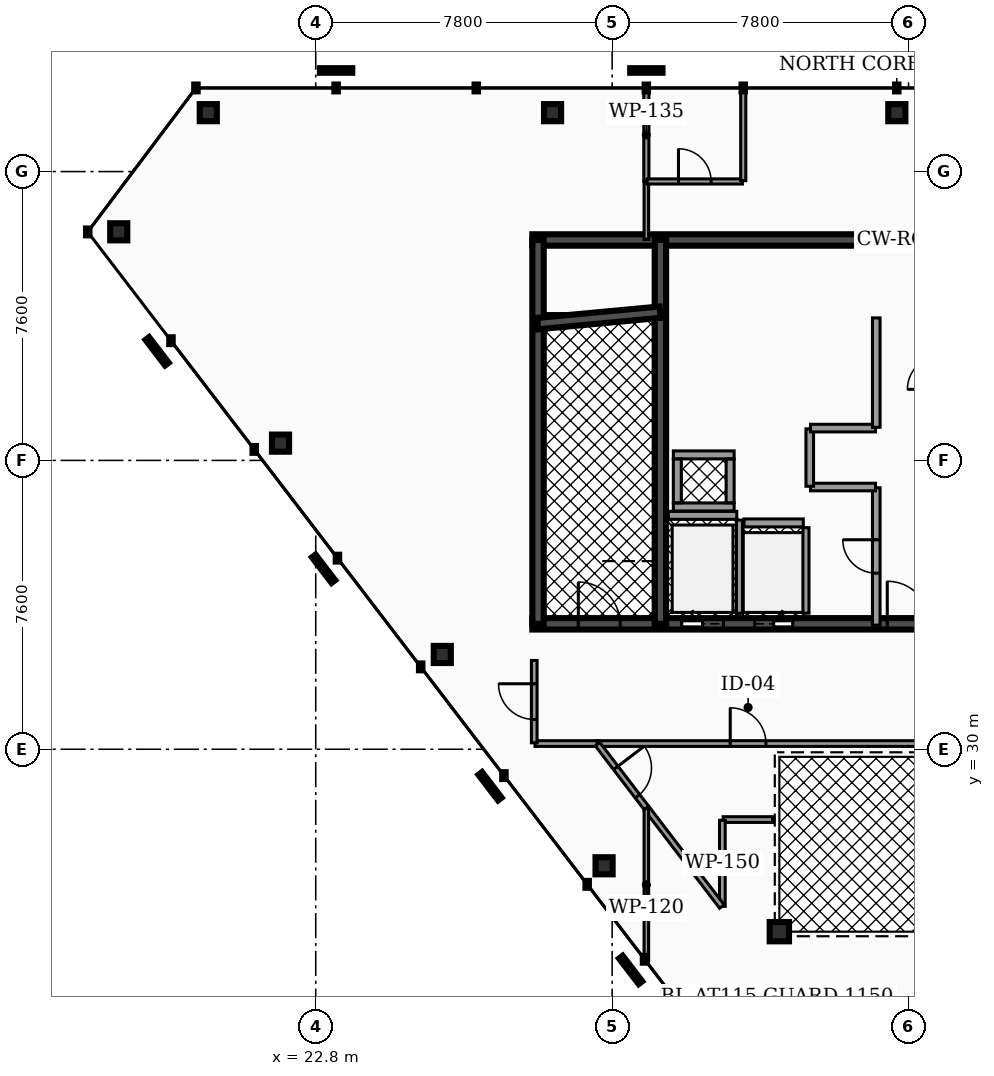
"""IFC4 building model, lengths in metres.
Left out: names, types, materials, properties, quantities, classifications, styles, units other than length and angle.
Written with IfcOpenShell. Run it as: python <this file> out.ifc"""

import sys

from ifc_helpers import new_model, si_unit, direction, frame, frame_2d, origin, origin_2d, place, context, subcontext, project, spatial, rectangle, hollow_rectangle, hollow_circle, extrude, element, fill, save


model = new_model("IFC4")
c1 = context("Model", 3, precision=1e-05, world=origin(), true_north=direction((0.0, 1.0)))
c2 = subcontext(c1, "Body", "Model", "MODEL_VIEW")
j1 = project(units=[si_unit("LENGTHUNIT", "METRE"), si_unit("PLANEANGLEUNIT", "RADIAN")], contexts=[c1])
p1 = place(None, origin())
s1 = spatial("IfcSite", under=j1, at=p1, CompositionType="ELEMENT")
p2 = place(p1, origin())
s2 = spatial("IfcBuilding", under=s1, at=p2, CompositionType="ELEMENT")
p3 = place(p2, frame((0.0, 0.0, 299.2)))
s3 = spatial("IfcBuildingStorey", under=s2, at=p3, CompositionType="ELEMENT", Elevation=299.2)
p4 = place(p3, frame((28.5, 43.4, 0.0), z_axis=(0.0, 0.0, 1.0), x_axis=(1.0, 0.0, 0.0)))
e1 = element("IfcWall", 1, at=p4, inside=s3, PredefinedType="SHEAR", context=c2, shape_type="SweptSolid", body=[
    extrude(rectangle(XDim=19.86, YDim=0.3, at=frame_2d((9.93, 0.0))), origin(), (0.0, 0.0, 1.0), 3.78),
])
p5 = place(p3, frame((28.5, 33.3, 0.0), z_axis=(0.0, 0.0, 1.0), x_axis=(1.0, 0.0, 0.0)))
e2 = element("IfcWall", 2, at=p5, inside=s3, PredefinedType="SHEAR", context=c2, shape_type="SweptSolid", body=[
    extrude(rectangle(XDim=19.86, YDim=0.3, at=frame_2d((9.93, 0.0))), origin(), (0.0, 0.0, 1.0), 3.78),
])
p6 = place(p5, frame((3.93, 0.0, 0.0)))
e3 = element("IfcOpeningElement", 3, at=p6, cuts=e2, PredefinedType="OPENING", context=c2, shape_type="SweptSolid", body=[
    extrude(rectangle(XDim=1.1, YDim=2.15, at=frame_2d((0.55, 1.075))), frame((0.0, 0.16, 0.0), z_axis=(0.0, -1.0, 0.0), x_axis=(1.0, 0.0, 0.0)), (0.0, 0.0, 1.0), 0.32),
])
p7 = place(p5, frame((14.77, 0.0, 0.0)))
e4 = element("IfcOpeningElement", 4, at=p7, cuts=e2, PredefinedType="OPENING", context=c2, shape_type="SweptSolid", body=[
    extrude(rectangle(XDim=1.1, YDim=2.15, at=frame_2d((0.55, 1.075))), frame((0.0, 0.16, 0.0), z_axis=(0.0, -1.0, 0.0), x_axis=(1.0, 0.0, 0.0)), (0.0, 0.0, 1.0), 0.32),
])
p8 = place(p5, frame((11.25, 0.0, 0.0)))
e5 = element("IfcOpeningElement", 5, at=p8, cuts=e2, PredefinedType="OPENING", context=c2, shape_type="SweptSolid", body=[
    extrude(rectangle(XDim=1.0, YDim=2.1, at=frame_2d((0.5, 1.05))), frame((0.0, 0.16, 0.0), z_axis=(0.0, -1.0, 0.0), x_axis=(1.0, 0.0, 0.0)), (0.0, 0.0, 1.0), 0.32),
])
p9 = place(p5, frame((12.95, 0.0, 0.0)))
e6 = element("IfcOpeningElement", 6, at=p9, cuts=e2, PredefinedType="OPENING", context=c2, shape_type="SweptSolid", body=[
    extrude(rectangle(XDim=1.0, YDim=2.1, at=frame_2d((0.5, 1.05))), frame((0.0, 0.16, 0.0), z_axis=(0.0, -1.0, 0.0), x_axis=(1.0, 0.0, 0.0)), (0.0, 0.0, 1.0), 0.32),
])
p10 = place(p5, frame((5.85, 0.0, 0.0)))
e7 = element("IfcOpeningElement", 7, at=p10, cuts=e2, PredefinedType="OPENING", context=c2, shape_type="SweptSolid", body=[
    extrude(rectangle(XDim=1.0, YDim=2.1, at=frame_2d((0.5, 1.05))), frame((0.0, 0.16, 0.0), z_axis=(0.0, -1.0, 0.0), x_axis=(1.0, 0.0, 0.0)), (0.0, 0.0, 1.0), 0.32),
])
p11 = place(p5, frame((1.21, 0.0, 0.0)))
e8 = element("IfcOpeningElement", 8, at=p11, cuts=e2, PredefinedType="OPENING", context=c2, shape_type="SweptSolid", body=[
    extrude(rectangle(XDim=1.1, YDim=2.2, at=frame_2d((0.55, 1.1))), frame((0.0, 0.16, 0.0), z_axis=(0.0, -1.0, 0.0), x_axis=(1.0, 0.0, 0.0)), (0.0, 0.0, 1.0), 0.32),
])
p12 = place(p5, frame((9.34, 0.0, 0.0)))
e9 = element("IfcOpeningElement", 9, at=p12, cuts=e2, PredefinedType="OPENING", context=c2, shape_type="SweptSolid", body=[
    extrude(rectangle(XDim=1.12, YDim=2.05, at=frame_2d((0.56, 1.025))), frame((0.0, 0.16, 0.0), z_axis=(0.0, -1.0, 0.0), x_axis=(1.0, 0.0, 0.0)), (0.0, 0.0, 1.0), 0.32),
])
p13 = place(p5, frame((17.55, 0.0, 0.0)))
e10 = element("IfcOpeningElement", 10, at=p13, cuts=e2, PredefinedType="OPENING", context=c2, shape_type="SweptSolid", body=[
    extrude(rectangle(XDim=1.1, YDim=2.2, at=frame_2d((0.55, 1.1))), frame((0.0, 0.16, 0.0), z_axis=(0.0, -1.0, 0.0), x_axis=(1.0, 0.0, 0.0)), (0.0, 0.0, 1.0), 0.32),
])
for number, where, z_axis, x_axis in (
    (11, (28.65, 33.3, 0.0), (0.0, 0.0, 1.0), (0.0, 1.0, 0.0)),
    (12, (31.87, 33.3, 0.0), (0.0, 0.0, 1.0), (0.0, 1.0, 0.0)),
):
    element("IfcWall", number, at=place(p3, frame(where, z_axis=z_axis, x_axis=x_axis)), inside=s3, PredefinedType="SHEAR", context=c2, shape_type="SweptSolid", body=[
        extrude(rectangle(XDim=10.1, YDim=0.3, at=frame_2d((5.05, 0.0))), origin(), (0.0, 0.0, 1.0), 3.78),
    ])
p14 = place(p3, frame((28.64, 41.2, 0.0), z_axis=(0.0, 0.0, 1.0), x_axis=(0.995687118776, 0.092774789157, 0.0)))
e13 = element("IfcWall", 13, at=p14, inside=s3, PredefinedType="SHEAR", context=c2, shape_type="SweptSolid", body=[
    extrude(rectangle(XDim=3.234, YDim=0.3, at=frame_2d((1.617, 0.0))), origin(), (0.0, 0.0, 1.0), 3.78),
])
for number, where, z_axis, x_axis in (
    (14, (38.091, 46.75, 0.0), (0.0, 0.0, 1.0), (1.0, 0.0, 0.0)),
    (15, (29.032, 46.75, 0.0), (0.0, 0.0, 1.0), (1.0, 0.0, 0.0)),
    (16, (19.973, 46.75, 0.0), (0.0, 0.0, 1.0), (1.0, 0.0, 0.0)),
    (17, (17.616, 43.615, 0.0), (0.0, 0.0, 1.0), (1.0, 0.0, 0.0)),
    (18, (21.873, 38.055, 0.0), (0.0, 0.0, 1.0), (1.0, 0.0, 0.0)),
    (19, (26.131, 32.494, 0.0), (0.0, 0.0, 1.0), (1.0, 0.0, 0.0)),
    (20, (30.388, 26.934, 0.0), (0.0, 0.0, 1.0), (1.0, 0.0, 0.0)),
):
    element("IfcColumn", number, at=place(p3, frame(where, z_axis=z_axis, x_axis=x_axis)), inside=s3, PredefinedType="COLUMN", context=c2, shape_type="SweptSolid", body=[
        extrude(hollow_rectangle(XDim=0.45, YDim=0.45, WallThickness=0.022, at=origin_2d()), origin(), (0.0, 0.0, 1.0), 3.78),
    ])
p15 = place(p3, frame((35.0, 25.2, 0.0), z_axis=(0.0, 0.0, 1.0), x_axis=(1.0, 0.0, 0.0)))
e21 = element("IfcColumn", 21, at=p15, inside=s3, PredefinedType="COLUMN", context=c2, shape_type="SweptSolid", body=[
    extrude(hollow_circle(Radius=0.254, WallThickness=0.02, at=origin_2d()), origin(), (0.0, 0.0, 1.0), 3.78),
])
p16 = place(p3, frame((32.08, 36.155, 0.0), z_axis=(0.0, 0.0, 1.0), x_axis=(1.0, 0.0, 0.0)))
e22 = element("IfcWall", 22, at=p16, inside=s3, PredefinedType="SOLIDWALL", context=c2, shape_type="SweptSolid", body=[
    extrude(rectangle(XDim=1.8, YDim=0.21, at=frame_2d((0.9, 0.0))), origin(), (0.0, 0.0, 1.0), 2.85),
])
p17 = place(p3, frame((33.95, 33.58, 0.0), z_axis=(0.0, 0.0, 1.0), x_axis=(0.0, 1.0, 0.0)))
e23 = element("IfcWall", 23, at=p17, inside=s3, PredefinedType="SOLIDWALL", context=c2, shape_type="SweptSolid", body=[
    extrude(rectangle(XDim=2.45, YDim=0.16, at=frame_2d((1.225, 0.0))), origin(), (0.0, 0.0, 1.0), 2.85),
])
p18 = place(p3, frame((34.07, 35.955, 0.0), z_axis=(0.0, 0.0, 1.0), x_axis=(1.0, 0.0, 0.0)))
e24 = element("IfcWall", 24, at=p18, inside=s3, PredefinedType="SOLIDWALL", context=c2, shape_type="SweptSolid", body=[
    extrude(rectangle(XDim=1.56, YDim=0.21, at=frame_2d((0.78, 0.0))), origin(), (0.0, 0.0, 1.0), 2.85),
])
p19 = place(p3, frame((35.7, 33.58, 0.0), z_axis=(0.0, 0.0, 1.0), x_axis=(0.0, 1.0, 0.0)))
e25 = element("IfcWall", 25, at=p19, inside=s3, PredefinedType="SOLIDWALL", context=c2, shape_type="SweptSolid", body=[
    extrude(rectangle(XDim=2.25, YDim=0.16, at=frame_2d((1.125, 0.0))), origin(), (0.0, 0.0, 1.0), 2.85),
])
for number, where, z_axis, x_axis in (
    (26, (32.21, 36.375, 0.0), (0.0, 0.0, 1.0), (1.0, 0.0, 0.0)),
    (27, (32.21, 37.745, 0.0), (0.0, 0.0, 1.0), (1.0, 0.0, 0.0)),
):
    element("IfcWall", number, at=place(p3, frame(where, z_axis=z_axis, x_axis=x_axis)), inside=s3, PredefinedType="SOLIDWALL", context=c2, shape_type="SweptSolid", body=[
        extrude(rectangle(XDim=1.6, YDim=0.21, at=frame_2d((0.8, 0.0))), origin(), (0.0, 0.0, 1.0), 3.78),
    ])
for number, where, z_axis, x_axis in (
    (28, (32.315, 36.485, 0.0), (0.0, 0.0, 1.0), (0.0, 1.0, 0.0)),
    (29, (33.705, 36.485, 0.0), (0.0, 0.0, 1.0), (0.0, 1.0, 0.0)),
):
    element("IfcWall", number, at=place(p3, frame(where, z_axis=z_axis, x_axis=x_axis)), inside=s3, PredefinedType="SOLIDWALL", context=c2, shape_type="SweptSolid", body=[
        extrude(rectangle(XDim=1.15, YDim=0.21, at=frame_2d((0.575, 0.0))), origin(), (0.0, 0.0, 1.0), 3.78),
    ])
p20 = place(p3, frame((37.55, 33.265, 0.0), z_axis=(0.0, 0.0, 1.0), x_axis=(0.0, 1.0, 0.0)))
e30 = element("IfcWall", 30, at=p20, inside=s3, PredefinedType="PARTITIONING", context=c2, shape_type="SweptSolid", body=[
    extrude(rectangle(XDim=3.615, YDim=0.2, at=frame_2d((1.808, 0.0))), origin(), (0.0, 0.0, 1.0), 2.835),
])
p21 = place(p20, frame((1.367, 0.0, 0.0)))
e31 = element("IfcOpeningElement", 31, at=p21, cuts=e30, PredefinedType="OPENING", context=c2, shape_type="SweptSolid", body=[
    extrude(rectangle(XDim=0.88, YDim=2.05, at=frame_2d((0.44, 1.025))), frame((0.0, 0.11, 0.0), z_axis=(0.0, -1.0, 0.0), x_axis=(1.0, 0.0, 0.0)), (0.0, 0.0, 1.0), 0.22),
])
p22 = place(p3, frame((35.82, 36.9, 0.0), z_axis=(0.0, 0.0, 1.0), x_axis=(1.0, 0.0, 0.0)))
e32 = element("IfcWall", 32, at=p22, inside=s3, PredefinedType="PARTITIONING", context=c2, shape_type="SweptSolid", body=[
    extrude(rectangle(XDim=1.71, YDim=0.2, at=frame_2d((0.855, 0.0))), origin(), (0.0, 0.0, 1.0), 2.835),
])
p23 = place(p3, frame((35.8, 36.92, 0.0), z_axis=(0.0, 0.0, 1.0), x_axis=(0.0, 1.0, 0.0)))
e33 = element("IfcWall", 33, at=p23, inside=s3, PredefinedType="PARTITIONING", context=c2, shape_type="SweptSolid", body=[
    extrude(rectangle(XDim=1.51, YDim=0.2, at=frame_2d((0.755, 0.0))), origin(), (0.0, 0.0, 1.0), 2.835),
])
p24 = place(p3, frame((35.82, 38.45, 0.0), z_axis=(0.0, 0.0, 1.0), x_axis=(1.0, 0.0, 0.0)))
e34 = element("IfcWall", 34, at=p24, inside=s3, PredefinedType="PARTITIONING", context=c2, shape_type="SweptSolid", body=[
    extrude(rectangle(XDim=1.71, YDim=0.2, at=frame_2d((0.855, 0.0))), origin(), (0.0, 0.0, 1.0), 2.835),
])
p25 = place(p3, frame((37.55, 38.47, 0.0), z_axis=(0.0, 0.0, 1.0), x_axis=(0.0, 1.0, 0.0)))
e35 = element("IfcWall", 35, at=p25, inside=s3, PredefinedType="PARTITIONING", context=c2, shape_type="SweptSolid", body=[
    extrude(rectangle(XDim=2.88, YDim=0.2, at=frame_2d((1.44, 0.0))), origin(), (0.0, 0.0, 1.0), 2.835),
])
p26 = place(p3, frame((30.21, 30.15, 0.0), z_axis=(0.0, 0.0, 1.0), x_axis=(1.0, 0.0, 0.0)))
e36 = element("IfcWall", 36, at=p26, inside=s3, PredefinedType="PARTITIONING", context=c2, shape_type="SweptSolid", body=[
    extrude(rectangle(XDim=15.135, YDim=0.15, at=frame_2d((7.568, 0.0))), origin(), (0.0, 0.0, 1.0), 2.835),
])
p27 = place(p26, frame((3.498, 0.0, 0.0)))
e37 = element("IfcOpeningElement", 37, at=p27, cuts=e36, PredefinedType="OPENING", context=c2, shape_type="SweptSolid", body=[
    extrude(rectangle(XDim=0.94, YDim=2.05, at=frame_2d((0.47, 1.025))), frame((0.0, 0.085, 0.0), z_axis=(0.0, -1.0, 0.0), x_axis=(1.0, 0.0, 0.0)), (0.0, 0.0, 1.0), 0.17),
])
p28 = place(p3, frame((28.57, 30.15, 0.0), z_axis=(0.0, 0.0, 1.0), x_axis=(1.0, 0.0, 0.0)))
e38 = element("IfcWall", 38, at=p28, inside=s3, PredefinedType="PARTITIONING", context=c2, shape_type="SweptSolid", body=[
    extrude(rectangle(XDim=1.634, YDim=0.15, at=frame_2d((0.817, 0.0))), origin(), (0.0, 0.0, 1.0), 2.835),
])
p29 = place(p3, frame((28.55, 30.17, 0.0), z_axis=(0.0, 0.0, 1.0), x_axis=(0.0, 1.0, 0.0)))
e39 = element("IfcWall", 39, at=p29, inside=s3, PredefinedType="PARTITIONING", context=c2, shape_type="SweptSolid", body=[
    extrude(rectangle(XDim=2.166, YDim=0.15, at=frame_2d((1.083, 0.0))), origin(), (0.0, 0.0, 1.0), 2.835),
])
p30 = place(p29, frame((0.613, 0.0, 0.0)))
e40 = element("IfcOpeningElement", 40, at=p30, cuts=e39, PredefinedType="OPENING", context=c2, shape_type="SweptSolid", body=[
    extrude(rectangle(XDim=0.94, YDim=2.05, at=frame_2d((0.47, 1.025))), frame((0.0, 0.085, 0.0), z_axis=(0.0, -1.0, 0.0), x_axis=(1.0, 0.0, 0.0)), (0.0, 0.0, 1.0), 0.17),
])
p31 = place(p3, frame((33.52, 28.15, 0.0), z_axis=(0.0, 0.0, 1.0), x_axis=(1.0, 0.0, 0.0)))
e41 = element("IfcWall", 41, at=p31, inside=s3, PredefinedType="PARTITIONING", context=c2, shape_type="SweptSolid", body=[
    extrude(rectangle(XDim=1.3, YDim=0.15, at=frame_2d((0.65, 0.0))), origin(), (0.0, 0.0, 1.0), 2.835),
])
p32 = place(p3, frame((33.5, 25.866, 0.0), z_axis=(0.0, 0.0, 1.0), x_axis=(0.0, 1.0, 0.0)))
e42 = element("IfcWall", 42, at=p32, inside=s3, PredefinedType="PARTITIONING", context=c2, shape_type="SweptSolid", body=[
    extrude(rectangle(XDim=2.264, YDim=0.15, at=frame_2d((1.132, 0.0))), origin(), (0.0, 0.0, 1.0), 2.835),
])
p33 = place(p3, frame((31.503, 28.454, 0.0), z_axis=(0.0, 0.0, 1.0), x_axis=(0.607891349871, -0.7940202181, 0.0)))
e43 = element("IfcWall", 43, at=p33, inside=s3, PredefinedType="PARTITIONING", context=c2, shape_type="SweptSolid", body=[
    extrude(rectangle(XDim=3.265, YDim=0.15, at=frame_2d((1.632, 0.0))), origin(), (0.0, 0.0, 1.0), 2.835),
])
p34 = place(p3, frame((30.217, 30.134, 0.0), z_axis=(0.0, 0.0, 1.0), x_axis=(0.607857058986, -0.794046469572, 0.0)))
e44 = element("IfcWall", 44, at=p34, inside=s3, PredefinedType="PARTITIONING", context=c2, shape_type="SweptSolid", body=[
    extrude(rectangle(XDim=2.115, YDim=0.15, at=frame_2d((1.058, 0.0))), origin(), (0.0, 0.0, 1.0), 2.835),
])
p35 = place(p34, frame((0.788, 0.0, 0.0)))
e45 = element("IfcOpeningElement", 45, at=p35, cuts=e44, PredefinedType="OPENING", context=c2, shape_type="SweptSolid", body=[
    extrude(rectangle(XDim=0.94, YDim=2.05, at=frame_2d((0.47, 1.025))), frame((0.0, 0.085, 0.0), z_axis=(0.0, -1.0, 0.0), x_axis=(1.0, 0.0, 0.0)), (0.0, 0.0, 1.0), 0.17),
])
p36 = place(p3, frame((31.5, 24.427, 0.0), z_axis=(0.0, 0.0, 1.0), x_axis=(0.0, 1.0, 0.0)))
e46 = element("IfcWall", 46, at=p36, inside=s3, PredefinedType="PARTITIONING", context=c2, shape_type="SweptSolid", body=[
    extrude(rectangle(XDim=4.012, YDim=0.12, at=frame_2d((2.006, 0.0))), origin(), (0.0, 0.0, 1.0), 2.835),
])
p37 = place(p3, frame((31.5, 43.415, 0.0), z_axis=(0.0, 0.0, 1.0), x_axis=(0.0, 1.0, 0.0)))
e47 = element("IfcWall", 47, at=p37, inside=s3, PredefinedType="PARTITIONING", context=c2, shape_type="SweptSolid", body=[
    extrude(rectangle(XDim=1.52, YDim=0.12, at=frame_2d((0.76, 0.0))), origin(), (0.0, 0.0, 1.0), 2.835),
])
p38 = place(p3, frame((31.5, 44.945, 0.0), z_axis=(0.0, 0.0, 1.0), x_axis=(0.0, 1.0, 0.0)))
e48 = element("IfcWall", 48, at=p38, inside=s3, PredefinedType="PARTITIONING", context=c2, shape_type="SweptSolid", body=[
    extrude(rectangle(XDim=2.44, YDim=0.135, at=frame_2d((1.22, 0.0))), origin(), (0.0, 0.0, 1.0), 2.835),
])
p39 = place(p3, frame((31.52, 44.94, 0.0), z_axis=(0.0, 0.0, 1.0), x_axis=(1.0, 0.0, 0.0)))
e49 = element("IfcWall", 49, at=p39, inside=s3, PredefinedType="PARTITIONING", context=c2, shape_type="SweptSolid", body=[
    extrude(rectangle(XDim=2.51, YDim=0.135, at=frame_2d((1.255, 0.0))), origin(), (0.0, 0.0, 1.0), 2.835),
])
p40 = place(p39, frame((0.825, 0.0, 0.0)))
e50 = element("IfcOpeningElement", 50, at=p40, cuts=e49, PredefinedType="OPENING", context=c2, shape_type="SweptSolid", body=[
    extrude(rectangle(XDim=0.86, YDim=2.05, at=frame_2d((0.43, 1.025))), frame((0.0, 0.077, 0.0), z_axis=(0.0, -1.0, 0.0), x_axis=(1.0, 0.0, 0.0)), (0.0, 0.0, 1.0), 0.155),
])
p41 = place(p3, frame((34.05, 44.96, 0.0), z_axis=(0.0, 0.0, 1.0), x_axis=(0.0, 1.0, 0.0)))
e51 = element("IfcWall", 51, at=p41, inside=s3, PredefinedType="PARTITIONING", context=c2, shape_type="SweptSolid", body=[
    extrude(rectangle(XDim=2.425, YDim=0.135, at=frame_2d((1.212, 0.0))), origin(), (0.0, 0.0, 1.0), 2.835),
])
p42 = place(p2, frame((0.0, 0.0, 303.28)))
p43 = place(p42, frame((0.0, 0.0, -0.3)))
p44 = place(p43, frame((35.2, 30.8, 0.0)))
p45 = place(p44, frame((0.0, 0.0, 0.25)))
e52 = element("IfcWindow", 52, at=p45, inside=s3, PartitioningType="SINGLE_PANEL", PredefinedType="SKYLIGHT", context=c2, shape_type="SweptSolid", body=[
    extrude(rectangle(XDim=2.4, YDim=2.4, at=origin_2d()), origin(), (0.0, 0.0, 1.0), 0.05),
])
p46 = place(p43, frame((35.2, 43.4, 0.0)))
p47 = place(p46, frame((0.0, 0.0, 0.25)))
e53 = element("IfcWindow", 53, at=p47, inside=s3, PartitioningType="SINGLE_PANEL", PredefinedType="SKYLIGHT", context=c2, shape_type="SweptSolid", body=[
    extrude(rectangle(XDim=1.8, YDim=2.2, at=origin_2d()), origin(), (0.0, 0.0, 1.0), 0.05),
])
p48 = place(p43, frame((38.4, 43.4, 0.0)))
p49 = place(p48, frame((0.0, 0.0, 0.25)))
e54 = element("IfcWindow", 54, at=p49, inside=s3, PartitioningType="SINGLE_PANEL", PredefinedType="SKYLIGHT", context=c2, shape_type="SweptSolid", body=[
    extrude(rectangle(XDim=1.8, YDim=2.2, at=origin_2d()), origin(), (0.0, 0.0, 1.0), 0.05),
])
p50 = place(p43, frame((38.4, 30.8, 0.0)))
p51 = place(p50, frame((0.0, 0.0, 0.25)))
e55 = element("IfcWindow", 55, at=p51, inside=s3, PartitioningType="SINGLE_PANEL", PredefinedType="SKYLIGHT", context=c2, shape_type="SweptSolid", body=[
    extrude(rectangle(XDim=1.8, YDim=2.2, at=origin_2d()), origin(), (0.0, 0.0, 1.0), 0.05),
])
p52 = place(p43, frame((38.4, 36.8, 0.0)))
p53 = place(p52, frame((0.0, 0.0, 0.25)))
e56 = element("IfcWindow", 56, at=p53, inside=s3, PartitioningType="SINGLE_PANEL", PredefinedType="SKYLIGHT", context=c2, shape_type="SweptSolid", body=[
    extrude(rectangle(XDim=0.9, YDim=1.2, at=origin_2d()), origin(), (0.0, 0.0, 1.0), 0.05),
])
p54 = place(p6, origin())
e57 = element("IfcDoor", 57, at=p54, inside=s3, OperationType="SLIDING_TO_LEFT", PredefinedType="DOOR", context=c2, shape_type="SweptSolid", body=[
    extrude(rectangle(XDim=1.1, YDim=2.15, at=frame_2d((0.55, 1.075))), frame((0.0, 0.025, 0.0), z_axis=(0.0, -1.0, 0.0), x_axis=(1.0, 0.0, 0.0)), (0.0, 0.0, 1.0), 0.05),
])
fill(e3, e57)
p55 = place(p10, origin())
e58 = element("IfcDoor", 58, at=p55, inside=s3, OperationType="SLIDING_TO_RIGHT", PredefinedType="DOOR", context=c2, shape_type="SweptSolid", body=[
    extrude(rectangle(XDim=1.0, YDim=2.1, at=frame_2d((0.5, 1.05))), frame((0.0, 0.025, 0.0), z_axis=(0.0, -1.0, 0.0), x_axis=(1.0, 0.0, 0.0)), (0.0, 0.0, 1.0), 0.05),
])
fill(e7, e58)
p56 = place(p11, origin())
e59 = element("IfcDoor", 59, at=p56, inside=s3, OperationType="SINGLE_SWING_LEFT", PredefinedType="DOOR", context=c2, shape_type="SweptSolid", body=[
    extrude(rectangle(XDim=1.1, YDim=2.2, at=frame_2d((0.55, 1.1))), frame((0.0, 0.025, 0.0), z_axis=(0.0, -1.0, 0.0), x_axis=(1.0, 0.0, 0.0)), (0.0, 0.0, 1.0), 0.05),
])
fill(e8, e59)
p57 = place(p12, origin())
e60 = element("IfcDoor", 60, at=p57, inside=s3, OperationType="SINGLE_SWING_LEFT", PredefinedType="DOOR", context=c2, shape_type="SweptSolid", body=[
    extrude(rectangle(XDim=1.12, YDim=2.05, at=frame_2d((0.56, 1.025))), frame((0.0, 0.025, 0.0), z_axis=(0.0, -1.0, 0.0), x_axis=(1.0, 0.0, 0.0)), (0.0, 0.0, 1.0), 0.05),
])
fill(e9, e60)
p58 = place(p21, origin())
e61 = element("IfcDoor", 61, at=p58, inside=s3, OperationType="SINGLE_SWING_RIGHT", PredefinedType="DOOR", context=c2, shape_type="SweptSolid", body=[
    extrude(rectangle(XDim=0.88, YDim=2.05, at=frame_2d((0.44, 1.025))), frame((0.0, 0.025, 0.0), z_axis=(0.0, -1.0, 0.0), x_axis=(1.0, 0.0, 0.0)), (0.0, 0.0, 1.0), 0.05),
])
fill(e31, e61)
p59 = place(p27, origin())
e62 = element("IfcDoor", 62, at=p59, inside=s3, OperationType="SINGLE_SWING_LEFT", PredefinedType="DOOR", context=c2, shape_type="SweptSolid", body=[
    extrude(rectangle(XDim=0.94, YDim=2.05, at=frame_2d((0.47, 1.025))), frame((0.0, 0.025, 0.0), z_axis=(0.0, -1.0, 0.0), x_axis=(1.0, 0.0, 0.0)), (0.0, 0.0, 1.0), 0.05),
])
fill(e37, e62)
p60 = place(p30, origin())
e63 = element("IfcDoor", 63, at=p60, inside=s3, OperationType="SINGLE_SWING_RIGHT", PredefinedType="DOOR", context=c2, shape_type="SweptSolid", body=[
    extrude(rectangle(XDim=0.94, YDim=2.05, at=frame_2d((0.47, 1.025))), frame((0.0, 0.025, 0.0), z_axis=(0.0, -1.0, 0.0), x_axis=(1.0, 0.0, 0.0)), (0.0, 0.0, 1.0), 0.05),
])
fill(e40, e63)
p61 = place(p35, origin())
e64 = element("IfcDoor", 64, at=p61, inside=s3, OperationType="SINGLE_SWING_LEFT", PredefinedType="DOOR", context=c2, shape_type="SweptSolid", body=[
    extrude(rectangle(XDim=0.94, YDim=2.05, at=frame_2d((0.47, 1.025))), frame((0.0, 0.025, 0.0), z_axis=(0.0, -1.0, 0.0), x_axis=(1.0, 0.0, 0.0)), (0.0, 0.0, 1.0), 0.05),
])
fill(e45, e64)
p62 = place(p40, origin())
e65 = element("IfcDoor", 65, at=p62, inside=s3, OperationType="SINGLE_SWING_LEFT", PredefinedType="DOOR", context=c2, shape_type="SweptSolid", body=[
    extrude(rectangle(XDim=0.86, YDim=2.05, at=frame_2d((0.43, 1.025))), frame((0.0, 0.025, 0.0), z_axis=(0.0, -1.0, 0.0), x_axis=(1.0, 0.0, 0.0)), (0.0, 0.0, 1.0), 0.05),
])
fill(e50, e65)
save(model, sys.argv[1])
